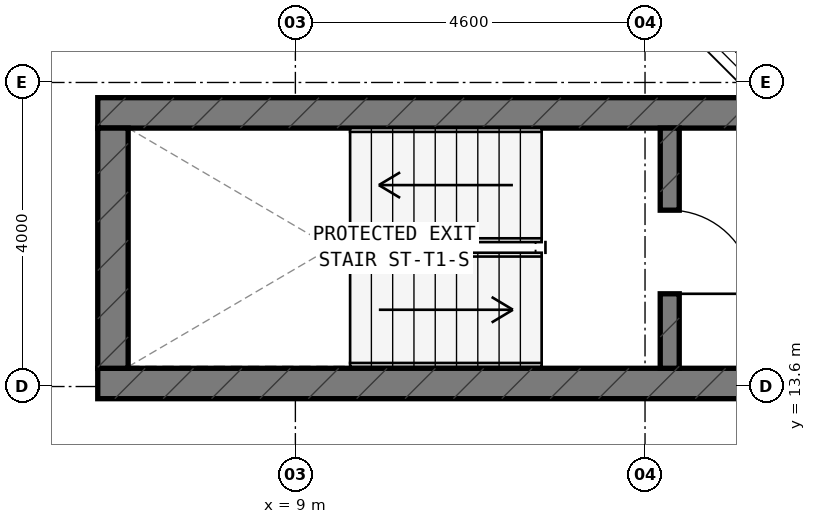
"""IFC4 building model, lengths in metres.
Left out: names, types, materials, properties, quantities, classifications, styles, units other than length and angle.
Written with IfcOpenShell. Run it as: python <this file> out.ifc"""

import sys

from ifc_helpers import new_model, si_unit, direction, frame, frame_2d, origin, place, context, subcontext, project, spatial, rectangle, extrude, element, fill, save


model = new_model("IFC4")
c1 = context("Model", 3, precision=1e-05, world=origin(), true_north=direction((0.0, 1.0)))
c2 = subcontext(c1, "Body", "Model", "MODEL_VIEW")
j1 = project(units=[si_unit("LENGTHUNIT", "METRE"), si_unit("PLANEANGLEUNIT", "RADIAN")], contexts=[c1])
p1 = place(None, origin())
s1 = spatial("IfcSite", under=j1, at=p1, CompositionType="ELEMENT")
p2 = place(p1, origin())
s2 = spatial("IfcBuilding", under=s1, at=p2, CompositionType="ELEMENT")
p3 = place(p2, frame((0.0, 0.0, 181.1)))
s3 = spatial("IfcBuildingStorey", under=s2, at=p3, CompositionType="ELEMENT", Elevation=181.1)
p4 = place(p3, frame((6.4, 13.64, 0.0), z_axis=(0.0, 0.0, 1.0), x_axis=(1.0, 0.0, 0.0)))
e1 = element("IfcWall", 1, at=p4, inside=s3, PredefinedType="SHEAR", context=c2, shape_type="SweptSolid", body=[
    extrude(rectangle(XDim=24.4, YDim=0.4, at=frame_2d((12.2, 0.0))), origin(), (0.0, 0.0, 1.0), 3.6),
])
p5 = place(p4, frame((9.15, 0.0, 0.0)))
e2 = element("IfcOpeningElement", 2, at=p5, cuts=e1, PredefinedType="OPENING", context=c2, shape_type="SweptSolid", body=[
    extrude(rectangle(XDim=1.2, YDim=2.15, at=frame_2d((0.6, 1.075))), frame((0.0, 0.21, 0.0), z_axis=(0.0, -1.0, 0.0), x_axis=(1.0, 0.0, 0.0)), (0.0, 0.0, 1.0), 0.42),
])
p6 = place(p4, frame((17.22, 0.0, 0.0)))
e3 = element("IfcOpeningElement", 3, at=p6, cuts=e1, PredefinedType="OPENING", context=c2, shape_type="SweptSolid", body=[
    extrude(rectangle(XDim=0.85, YDim=2.1, at=frame_2d((0.425, 1.05))), frame((0.0, 0.21, 0.0), z_axis=(0.0, -1.0, 0.0), x_axis=(1.0, 0.0, 0.0)), (0.0, 0.0, 1.0), 0.42),
])
p7 = place(p4, frame((18.783, 0.0, 0.0)))
e4 = element("IfcOpeningElement", 4, at=p7, cuts=e1, PredefinedType="OPENING", context=c2, shape_type="SweptSolid", body=[
    extrude(rectangle(XDim=1.1, YDim=2.15, at=frame_2d((0.55, 1.075))), frame((0.0, 0.21, 0.0), z_axis=(0.0, -1.0, 0.0), x_axis=(1.0, 0.0, 0.0)), (0.0, 0.0, 1.0), 0.42),
])
p8 = place(p4, frame((20.65, 0.0, 0.0)))
e5 = element("IfcOpeningElement", 5, at=p8, cuts=e1, PredefinedType="OPENING", context=c2, shape_type="SweptSolid", body=[
    extrude(rectangle(XDim=1.1, YDim=2.15, at=frame_2d((0.55, 1.075))), frame((0.0, 0.21, 0.0), z_axis=(0.0, -1.0, 0.0), x_axis=(1.0, 0.0, 0.0)), (0.0, 0.0, 1.0), 0.42),
])
p9 = place(p4, frame((22.517, 0.0, 0.0)))
e6 = element("IfcOpeningElement", 6, at=p9, cuts=e1, PredefinedType="OPENING", context=c2, shape_type="SweptSolid", body=[
    extrude(rectangle(XDim=1.1, YDim=2.15, at=frame_2d((0.55, 1.075))), frame((0.0, 0.21, 0.0), z_axis=(0.0, -1.0, 0.0), x_axis=(1.0, 0.0, 0.0)), (0.0, 0.0, 1.0), 0.42),
])
p10 = place(p3, frame((6.4, 17.2, 0.0), z_axis=(0.0, 0.0, 1.0), x_axis=(1.0, 0.0, 0.0)))
e7 = element("IfcWall", 7, at=p10, inside=s3, PredefinedType="SHEAR", context=c2, shape_type="SweptSolid", body=[
    extrude(rectangle(XDim=24.4, YDim=0.4, at=frame_2d((12.2, 0.0))), origin(), (0.0, 0.0, 1.0), 3.6),
])
p11 = place(p3, frame((6.6, 13.84, 0.0), z_axis=(0.0, 0.0, 1.0), x_axis=(0.0, 1.0, 0.0)))
e8 = element("IfcWall", 8, at=p11, inside=s3, PredefinedType="SHEAR", context=c2, shape_type="SweptSolid", body=[
    extrude(rectangle(XDim=3.16, YDim=0.4, at=frame_2d((1.58, 0.0))), origin(), (0.0, 0.0, 1.0), 3.6),
])
p12 = place(p3, frame((13.925, 13.84, 0.0), z_axis=(0.0, 0.0, 1.0), x_axis=(0.0, 1.0, 0.0)))
e9 = element("IfcWall", 9, at=p12, inside=s3, PredefinedType="STANDARD", context=c2, shape_type="SweptSolid", body=[
    extrude(rectangle(XDim=3.16, YDim=0.25, at=frame_2d((1.58, 0.0))), origin(), (0.0, 0.0, 1.0), 3.32),
])
p13 = place(p12, frame((0.98, 0.0, 0.0)))
e10 = element("IfcOpeningElement", 10, at=p13, cuts=e9, PredefinedType="OPENING", context=c2, shape_type="SweptSolid", body=[
    extrude(rectangle(XDim=1.1, YDim=2.15, at=frame_2d((0.55, 1.075))), frame((0.0, 0.135, 0.0), z_axis=(0.0, -1.0, 0.0), x_axis=(1.0, 0.0, 0.0)), (0.0, 0.0, 1.0), 0.27),
])
p14 = place(p3, frame((15.278, 17.338, 0.0), z_axis=(0.0, 0.0, 1.0), x_axis=(-0.707106781187, 0.707106781187, 0.0)))
e11 = element("IfcWall", 11, at=p14, inside=s3, PredefinedType="STANDARD", context=c2, shape_type="SweptSolid", body=[
    extrude(rectangle(XDim=2.529, YDim=0.26, at=frame_2d((1.264, 0.0))), origin(), (0.0, 0.0, 1.0), 3.32),
])
p15 = place(p14, frame((0.364, 0.0, 0.85)))
e12 = element("IfcOpeningElement", 12, at=p15, cuts=e11, PredefinedType="OPENING", context=c2, shape_type="SweptSolid", body=[
    extrude(rectangle(XDim=1.8, YDim=1.5, at=frame_2d((0.9, 0.75))), frame((0.0, 0.14, 0.0), z_axis=(0.0, -1.0, 0.0), x_axis=(1.0, 0.0, 0.0)), (0.0, 0.0, 1.0), 0.28),
])
p16 = place(p15, origin())
e13 = element("IfcWindow", 13, at=p16, inside=s3, PartitioningType="SINGLE_PANEL", PredefinedType="WINDOW", context=c2, shape_type="SweptSolid", body=[
    extrude(rectangle(XDim=1.8, YDim=1.5, at=frame_2d((0.9, 0.75))), frame((0.0, 0.03, 0.0), z_axis=(0.0, -1.0, 0.0), x_axis=(1.0, 0.0, 0.0)), (0.0, 0.0, 1.0), 0.06),
])
fill(e12, e13)
p17 = place(p13, frame((1.1, 0.0, 0.0), z_axis=(0.0, 0.0, 1.0), x_axis=(-1.0, 0.0, 0.0)))
e14 = element("IfcDoor", 14, at=p17, inside=s3, OperationType="SINGLE_SWING_RIGHT", PredefinedType="DOOR", context=c2, shape_type="SweptSolid", body=[
    extrude(rectangle(XDim=1.1, YDim=2.15, at=frame_2d((0.55, 1.075))), frame((0.0, 0.025, 0.0), z_axis=(0.0, -1.0, 0.0), x_axis=(1.0, 0.0, 0.0)), (0.0, 0.0, 1.0), 0.05),
])
fill(e10, e14)
save(model, sys.argv[1])
